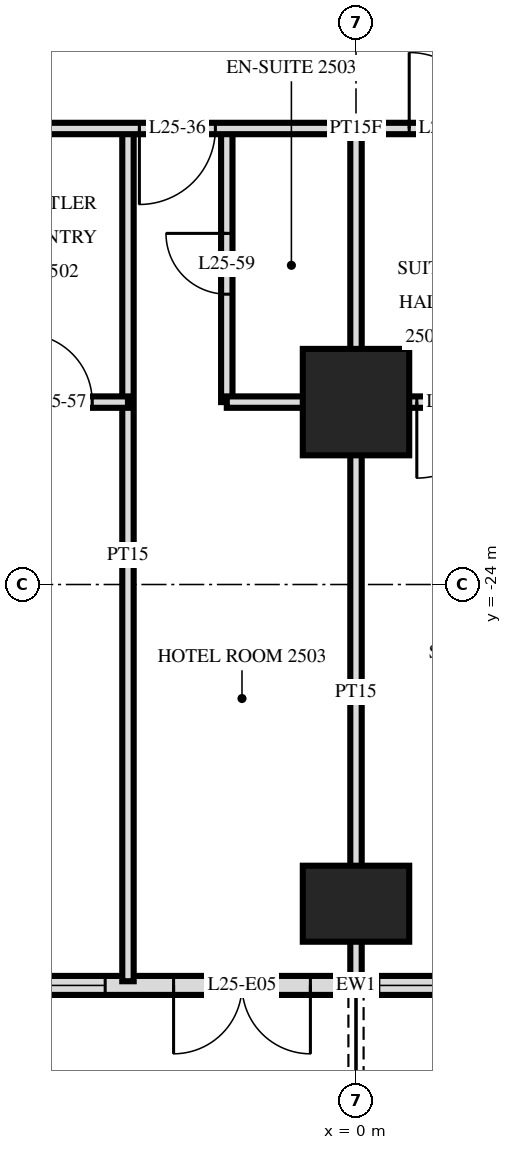
"""IFC4 building model, lengths in metres.
Left out: names, types, materials, properties, quantities, classifications, styles, units other than length and angle.
Written with IfcOpenShell. Run it as: python <this file> out.ifc"""

import sys

from ifc_helpers import new_model, si_unit, direction, frame, frame_2d, origin, origin_2d, place, context, subcontext, project, spatial, rectangle, extrude, element, fill, save


model = new_model("IFC4")
c1 = context("Model", 3, precision=1e-05, world=origin(), true_north=direction((0.0, 1.0)))
c2 = subcontext(c1, "Body", "Model", "MODEL_VIEW")
j1 = project(units=[si_unit("LENGTHUNIT", "METRE"), si_unit("PLANEANGLEUNIT", "RADIAN")], contexts=[c1])
p1 = place(None, origin())
s1 = spatial("IfcSite", under=j1, at=p1, CompositionType="ELEMENT")
p2 = place(p1, origin())
s2 = spatial("IfcBuilding", under=s1, at=p2, CompositionType="ELEMENT")
p3 = place(p2, frame((0.0, 0.0, 99.6)))
s3 = spatial("IfcBuildingStorey", under=s2, at=p3, CompositionType="ELEMENT", Elevation=99.6)
p4 = place(p3, frame((0.0, -28.2, 0.0), z_axis=(0.0, 0.0, 1.0), x_axis=(1.0, 0.0, 0.0)))
e1 = element("IfcColumn", 1, at=p4, inside=s3, PredefinedType="COLUMN", context=c2, shape_type="SweptSolid", body=[
    extrude(rectangle(XDim=1.4, YDim=1.0, at=origin_2d()), origin(), (0.0, 0.0, 1.0), 3.6),
])
p5 = place(p3, frame((0.0, -21.6, 0.0), z_axis=(0.0, 0.0, 1.0), x_axis=(1.0, 0.0, 0.0)))
e2 = element("IfcColumn", 2, at=p5, inside=s3, PredefinedType="COLUMN", context=c2, shape_type="SweptSolid", body=[
    extrude(rectangle(XDim=1.4, YDim=1.4, at=origin_2d()), origin(), (0.0, 0.0, 1.0), 3.6),
])
p6 = place(p3, frame((-28.775, -29.275, 0.0), z_axis=(0.0, 0.0, 1.0), x_axis=(1.0, 0.0, 0.0)))
e3 = element("IfcWall", 3, at=p6, inside=s3, PredefinedType="SOLIDWALL", context=c2, shape_type="SweptSolid", body=[
    extrude(rectangle(XDim=57.551, YDim=0.25, at=frame_2d((28.775, 0.0))), origin(), (0.0, 0.0, 1.0), 3.32),
])
p7 = place(p6, frame((0.575, 0.0, 0.0)))
e4 = element("IfcOpeningElement", 4, at=p7, cuts=e3, PredefinedType="OPENING", context=c2, shape_type="SweptSolid", body=[
    extrude(rectangle(XDim=1.8, YDim=2.4, at=frame_2d((0.9, 1.2))), frame((0.0, 0.135, 0.0), z_axis=(0.0, -1.0, 0.0), x_axis=(1.0, 0.0, 0.0)), (0.0, 0.0, 1.0), 0.27),
])
p8 = place(p6, frame((5.375, 0.0, 0.0)))
e5 = element("IfcOpeningElement", 5, at=p8, cuts=e3, PredefinedType="OPENING", context=c2, shape_type="SweptSolid", body=[
    extrude(rectangle(XDim=1.8, YDim=2.4, at=frame_2d((0.9, 1.2))), frame((0.0, 0.135, 0.0), z_axis=(0.0, -1.0, 0.0), x_axis=(1.0, 0.0, 0.0)), (0.0, 0.0, 1.0), 0.27),
])
p9 = place(p6, frame((8.075, 0.0, 0.3)))
e6 = element("IfcOpeningElement", 6, at=p9, cuts=e3, PredefinedType="OPENING", context=c2, shape_type="SweptSolid", body=[
    extrude(rectangle(XDim=2.4, YDim=2.1, at=frame_2d((1.2, 1.05))), frame((0.0, 0.135, 0.0), z_axis=(0.0, -1.0, 0.0), x_axis=(1.0, 0.0, 0.0)), (0.0, 0.0, 1.0), 0.27),
])
p10 = place(p6, frame((11.375, 0.0, 0.0)))
e7 = element("IfcOpeningElement", 7, at=p10, cuts=e3, PredefinedType="OPENING", context=c2, shape_type="SweptSolid", body=[
    extrude(rectangle(XDim=1.8, YDim=2.4, at=frame_2d((0.9, 1.2))), frame((0.0, 0.135, 0.0), z_axis=(0.0, -1.0, 0.0), x_axis=(1.0, 0.0, 0.0)), (0.0, 0.0, 1.0), 0.27),
])
p11 = place(p6, frame((14.075, 0.0, 0.3)))
e8 = element("IfcOpeningElement", 8, at=p11, cuts=e3, PredefinedType="OPENING", context=c2, shape_type="SweptSolid", body=[
    extrude(rectangle(XDim=2.4, YDim=2.1, at=frame_2d((1.2, 1.05))), frame((0.0, 0.135, 0.0), z_axis=(0.0, -1.0, 0.0), x_axis=(1.0, 0.0, 0.0)), (0.0, 0.0, 1.0), 0.27),
])
p12 = place(p6, frame((17.375, 0.0, 0.0)))
e9 = element("IfcOpeningElement", 9, at=p12, cuts=e3, PredefinedType="OPENING", context=c2, shape_type="SweptSolid", body=[
    extrude(rectangle(XDim=1.8, YDim=2.4, at=frame_2d((0.9, 1.2))), frame((0.0, 0.135, 0.0), z_axis=(0.0, -1.0, 0.0), x_axis=(1.0, 0.0, 0.0)), (0.0, 0.0, 1.0), 0.27),
])
p13 = place(p6, frame((20.075, 0.0, 0.3)))
e10 = element("IfcOpeningElement", 10, at=p13, cuts=e3, PredefinedType="OPENING", context=c2, shape_type="SweptSolid", body=[
    extrude(rectangle(XDim=2.4, YDim=2.1, at=frame_2d((1.2, 1.05))), frame((0.0, 0.135, 0.0), z_axis=(0.0, -1.0, 0.0), x_axis=(1.0, 0.0, 0.0)), (0.0, 0.0, 1.0), 0.27),
])
p14 = place(p6, frame((23.075, 0.0, 0.3)))
e11 = element("IfcOpeningElement", 11, at=p14, cuts=e3, PredefinedType="OPENING", context=c2, shape_type="SweptSolid", body=[
    extrude(rectangle(XDim=2.4, YDim=2.1, at=frame_2d((1.2, 1.05))), frame((0.0, 0.135, 0.0), z_axis=(0.0, -1.0, 0.0), x_axis=(1.0, 0.0, 0.0)), (0.0, 0.0, 1.0), 0.27),
])
p15 = place(p6, frame((26.375, 0.0, 0.0)))
e12 = element("IfcOpeningElement", 12, at=p15, cuts=e3, PredefinedType="OPENING", context=c2, shape_type="SweptSolid", body=[
    extrude(rectangle(XDim=1.8, YDim=2.4, at=frame_2d((0.9, 1.2))), frame((0.0, 0.135, 0.0), z_axis=(0.0, -1.0, 0.0), x_axis=(1.0, 0.0, 0.0)), (0.0, 0.0, 1.0), 0.27),
])
p16 = place(p6, frame((29.075, 0.0, 0.3)))
e13 = element("IfcOpeningElement", 13, at=p16, cuts=e3, PredefinedType="OPENING", context=c2, shape_type="SweptSolid", body=[
    extrude(rectangle(XDim=2.4, YDim=2.1, at=frame_2d((1.2, 1.05))), frame((0.0, 0.135, 0.0), z_axis=(0.0, -1.0, 0.0), x_axis=(1.0, 0.0, 0.0)), (0.0, 0.0, 1.0), 0.27),
])
p17 = place(p6, frame((32.375, 0.0, 0.0)))
e14 = element("IfcOpeningElement", 14, at=p17, cuts=e3, PredefinedType="OPENING", context=c2, shape_type="SweptSolid", body=[
    extrude(rectangle(XDim=1.8, YDim=2.4, at=frame_2d((0.9, 1.2))), frame((0.0, 0.135, 0.0), z_axis=(0.0, -1.0, 0.0), x_axis=(1.0, 0.0, 0.0)), (0.0, 0.0, 1.0), 0.27),
])
p18 = place(p6, frame((35.375, 0.0, 0.0)))
e15 = element("IfcOpeningElement", 15, at=p18, cuts=e3, PredefinedType="OPENING", context=c2, shape_type="SweptSolid", body=[
    extrude(rectangle(XDim=1.8, YDim=2.4, at=frame_2d((0.9, 1.2))), frame((0.0, 0.135, 0.0), z_axis=(0.0, -1.0, 0.0), x_axis=(1.0, 0.0, 0.0)), (0.0, 0.0, 1.0), 0.27),
])
p19 = place(p6, frame((38.075, 0.0, 0.3)))
e16 = element("IfcOpeningElement", 16, at=p19, cuts=e3, PredefinedType="OPENING", context=c2, shape_type="SweptSolid", body=[
    extrude(rectangle(XDim=2.4, YDim=2.1, at=frame_2d((1.2, 1.05))), frame((0.0, 0.135, 0.0), z_axis=(0.0, -1.0, 0.0), x_axis=(1.0, 0.0, 0.0)), (0.0, 0.0, 1.0), 0.27),
])
p20 = place(p6, frame((41.375, 0.0, 0.0)))
e17 = element("IfcOpeningElement", 17, at=p20, cuts=e3, PredefinedType="OPENING", context=c2, shape_type="SweptSolid", body=[
    extrude(rectangle(XDim=1.8, YDim=2.4, at=frame_2d((0.9, 1.2))), frame((0.0, 0.135, 0.0), z_axis=(0.0, -1.0, 0.0), x_axis=(1.0, 0.0, 0.0)), (0.0, 0.0, 1.0), 0.27),
])
p21 = place(p6, frame((44.075, 0.0, 0.3)))
e18 = element("IfcOpeningElement", 18, at=p21, cuts=e3, PredefinedType="OPENING", context=c2, shape_type="SweptSolid", body=[
    extrude(rectangle(XDim=2.4, YDim=2.1, at=frame_2d((1.2, 1.05))), frame((0.0, 0.135, 0.0), z_axis=(0.0, -1.0, 0.0), x_axis=(1.0, 0.0, 0.0)), (0.0, 0.0, 1.0), 0.27),
])
p22 = place(p6, frame((47.075, 0.0, 0.3)))
e19 = element("IfcOpeningElement", 19, at=p22, cuts=e3, PredefinedType="OPENING", context=c2, shape_type="SweptSolid", body=[
    extrude(rectangle(XDim=2.4, YDim=2.1, at=frame_2d((1.2, 1.05))), frame((0.0, 0.135, 0.0), z_axis=(0.0, -1.0, 0.0), x_axis=(1.0, 0.0, 0.0)), (0.0, 0.0, 1.0), 0.27),
])
p23 = place(p6, frame((50.375, 0.0, 0.0)))
e20 = element("IfcOpeningElement", 20, at=p23, cuts=e3, PredefinedType="OPENING", context=c2, shape_type="SweptSolid", body=[
    extrude(rectangle(XDim=1.8, YDim=2.4, at=frame_2d((0.9, 1.2))), frame((0.0, 0.135, 0.0), z_axis=(0.0, -1.0, 0.0), x_axis=(1.0, 0.0, 0.0)), (0.0, 0.0, 1.0), 0.27),
])
p24 = place(p6, frame((53.375, 0.0, 0.0)))
e21 = element("IfcOpeningElement", 21, at=p24, cuts=e3, PredefinedType="OPENING", context=c2, shape_type="SweptSolid", body=[
    extrude(rectangle(XDim=1.8, YDim=2.4, at=frame_2d((0.9, 1.2))), frame((0.0, 0.135, 0.0), z_axis=(0.0, -1.0, 0.0), x_axis=(1.0, 0.0, 0.0)), (0.0, 0.0, 1.0), 0.27),
])
p25 = place(p3, frame((0.0, -21.6, 0.0), z_axis=(0.0, 0.0, 1.0), x_axis=(0.0, 1.0, 0.0)))
e22 = element("IfcWall", 22, at=p25, inside=s3, PredefinedType="PARTITIONING", context=c2, shape_type="SweptSolid", body=[
    extrude(rectangle(XDim=3.6, YDim=0.15, at=frame_2d((1.8, 0.0))), origin(), (0.0, 0.0, 1.0), 3.32),
])
p26 = place(p3, frame((0.0, -29.22, 0.0), z_axis=(0.0, 0.0, 1.0), x_axis=(0.0, 1.0, 0.0)))
e23 = element("IfcWall", 23, at=p26, inside=s3, PredefinedType="PARTITIONING", context=c2, shape_type="SweptSolid", body=[
    extrude(rectangle(XDim=7.62, YDim=0.15, at=frame_2d((3.81, 0.0))), origin(), (0.0, 0.0, 1.0), 3.32),
])
p27 = place(p3, frame((-1.7, -21.6, 0.0), z_axis=(0.0, 0.0, 1.0), x_axis=(0.0, 1.0, 0.0)))
e24 = element("IfcWall", 24, at=p27, inside=s3, PredefinedType="PARTITIONING", context=c2, shape_type="SweptSolid", body=[
    extrude(rectangle(XDim=3.6, YDim=0.15, at=frame_2d((1.8, 0.0))), origin(), (0.0, 0.0, 1.0), 3.32),
])
p28 = place(p27, frame((1.42, 0.0, 0.0)))
e25 = element("IfcOpeningElement", 25, at=p28, cuts=e24, PredefinedType="OPENING", context=c2, shape_type="SweptSolid", body=[
    extrude(rectangle(XDim=0.8, YDim=2.1, at=frame_2d((0.4, 1.05))), frame((0.0, 0.085, 0.0), z_axis=(0.0, -1.0, 0.0), x_axis=(1.0, 0.0, 0.0)), (0.0, 0.0, 1.0), 0.17),
])
p29 = place(p3, frame((-3.0, -29.22, 0.0), z_axis=(0.0, 0.0, 1.0), x_axis=(0.0, 1.0, 0.0)))
e26 = element("IfcWall", 26, at=p29, inside=s3, PredefinedType="PARTITIONING", context=c2, shape_type="SweptSolid", body=[
    extrude(rectangle(XDim=11.22, YDim=0.15, at=frame_2d((5.61, 0.0))), origin(), (0.0, 0.0, 1.0), 3.32),
])
p30 = place(p3, frame((0.0, -21.6, 0.0), z_axis=(0.0, 0.0, 1.0), x_axis=(1.0, 0.0, 0.0)))
e27 = element("IfcWall", 27, at=p30, inside=s3, PredefinedType="PARTITIONING", context=c2, shape_type="SweptSolid", body=[
    extrude(rectangle(XDim=2.4, YDim=0.15, at=frame_2d((1.2, 0.0))), origin(), (0.0, 0.0, 1.0), 3.32),
])
p31 = place(p30, frame((0.8, 0.0, 0.0)))
e28 = element("IfcOpeningElement", 28, at=p31, cuts=e27, PredefinedType="OPENING", context=c2, shape_type="SweptSolid", body=[
    extrude(rectangle(XDim=1.0, YDim=2.1, at=frame_2d((0.5, 1.05))), frame((0.0, 0.085, 0.0), z_axis=(0.0, -1.0, 0.0), x_axis=(1.0, 0.0, 0.0)), (0.0, 0.0, 1.0), 0.17),
])
p32 = place(p3, frame((-10.8, -21.6, 0.0), z_axis=(0.0, 0.0, 1.0), x_axis=(1.0, 0.0, 0.0)))
e29 = element("IfcWall", 29, at=p32, inside=s3, PredefinedType="PARTITIONING", context=c2, shape_type="SweptSolid", body=[
    extrude(rectangle(XDim=7.8, YDim=0.15, at=frame_2d((3.9, 0.0))), origin(), (0.0, 0.0, 1.0), 3.32),
])
p33 = place(p32, frame((1.999, 0.0, 0.0)))
e30 = element("IfcOpeningElement", 30, at=p33, cuts=e29, PredefinedType="OPENING", context=c2, shape_type="SweptSolid", body=[
    extrude(rectangle(XDim=0.8, YDim=2.1, at=frame_2d((0.4, 1.05))), frame((0.0, 0.085, 0.0), z_axis=(0.0, -1.0, 0.0), x_axis=(1.0, 0.0, 0.0)), (0.0, 0.0, 1.0), 0.17),
])
p34 = place(p32, frame((3.1, 0.0, 0.0)))
e31 = element("IfcOpeningElement", 31, at=p34, cuts=e29, PredefinedType="OPENING", context=c2, shape_type="SweptSolid", body=[
    extrude(rectangle(XDim=0.9, YDim=2.1, at=frame_2d((0.45, 1.05))), frame((0.0, 0.085, 0.0), z_axis=(0.0, -1.0, 0.0), x_axis=(1.0, 0.0, 0.0)), (0.0, 0.0, 1.0), 0.17),
])
p35 = place(p32, frame((6.43, 0.0, 0.0)))
e32 = element("IfcOpeningElement", 32, at=p35, cuts=e29, PredefinedType="OPENING", context=c2, shape_type="SweptSolid", body=[
    extrude(rectangle(XDim=0.9, YDim=2.1, at=frame_2d((0.45, 1.05))), frame((0.0, 0.085, 0.0), z_axis=(0.0, -1.0, 0.0), x_axis=(1.0, 0.0, 0.0)), (0.0, 0.0, 1.0), 0.17),
])
p36 = place(p3, frame((-1.7, -21.6, 0.0), z_axis=(0.0, 0.0, 1.0), x_axis=(1.0, 0.0, 0.0)))
e33 = element("IfcWall", 33, at=p36, inside=s3, PredefinedType="PARTITIONING", context=c2, shape_type="SweptSolid", body=[
    extrude(rectangle(XDim=1.7, YDim=0.15, at=frame_2d((0.85, 0.0))), origin(), (0.0, 0.0, 1.0), 3.32),
])
p37 = place(p3, frame((-33.12, -18.0, 0.0), z_axis=(0.0, 0.0, 1.0), x_axis=(1.0, 0.0, 0.0)))
e34 = element("IfcWall", 34, at=p37, inside=s3, PredefinedType="PARTITIONING", context=c2, shape_type="SweptSolid", body=[
    extrude(rectangle(XDim=66.24, YDim=0.15, at=frame_2d((33.12, 0.0))), origin(), (0.0, 0.0, 1.0), 3.32),
])
p38 = place(p37, frame((14.02, 0.0, 0.0)))
e35 = element("IfcOpeningElement", 35, at=p38, cuts=e34, PredefinedType="OPENING", context=c2, shape_type="SweptSolid", body=[
    extrude(rectangle(XDim=1.0, YDim=2.1, at=frame_2d((0.5, 1.05))), frame((0.0, 0.085, 0.0), z_axis=(0.0, -1.0, 0.0), x_axis=(1.0, 0.0, 0.0)), (0.0, 0.0, 1.0), 0.17),
])
p39 = place(p37, frame((18.82, 0.0, 0.0)))
e36 = element("IfcOpeningElement", 36, at=p39, cuts=e34, PredefinedType="OPENING", context=c2, shape_type="SweptSolid", body=[
    extrude(rectangle(XDim=1.0, YDim=2.1, at=frame_2d((0.5, 1.05))), frame((0.0, 0.085, 0.0), z_axis=(0.0, -1.0, 0.0), x_axis=(1.0, 0.0, 0.0)), (0.0, 0.0, 1.0), 0.17),
])
p40 = place(p37, frame((30.27, 0.0, 0.0)))
e37 = element("IfcOpeningElement", 37, at=p40, cuts=e34, PredefinedType="OPENING", context=c2, shape_type="SweptSolid", body=[
    extrude(rectangle(XDim=1.0, YDim=2.1, at=frame_2d((0.5, 1.05))), frame((0.0, 0.085, 0.0), z_axis=(0.0, -1.0, 0.0), x_axis=(1.0, 0.0, 0.0)), (0.0, 0.0, 1.0), 0.17),
])
p41 = place(p37, frame((33.82, 0.0, 0.0)))
e38 = element("IfcOpeningElement", 38, at=p41, cuts=e34, PredefinedType="OPENING", context=c2, shape_type="SweptSolid", body=[
    extrude(rectangle(XDim=1.0, YDim=2.1, at=frame_2d((0.5, 1.05))), frame((0.0, 0.085, 0.0), z_axis=(0.0, -1.0, 0.0), x_axis=(1.0, 0.0, 0.0)), (0.0, 0.0, 1.0), 0.17),
])
p42 = place(p37, frame((46.27, 0.0, 0.0)))
e39 = element("IfcOpeningElement", 39, at=p42, cuts=e34, PredefinedType="OPENING", context=c2, shape_type="SweptSolid", body=[
    extrude(rectangle(XDim=1.0, YDim=2.1, at=frame_2d((0.5, 1.05))), frame((0.0, 0.085, 0.0), z_axis=(0.0, -1.0, 0.0), x_axis=(1.0, 0.0, 0.0)), (0.0, 0.0, 1.0), 0.17),
])
p43 = place(p37, frame((6.07, 0.0, 0.0)))
e40 = element("IfcOpeningElement", 40, at=p43, cuts=e34, PredefinedType="OPENING", context=c2, shape_type="SweptSolid", body=[
    extrude(rectangle(XDim=1.0, YDim=2.1, at=frame_2d((0.5, 1.05))), frame((0.0, 0.085, 0.0), z_axis=(0.0, -1.0, 0.0), x_axis=(1.0, 0.0, 0.0)), (0.0, 0.0, 1.0), 0.17),
])
p44 = place(p37, frame((60.37, 0.0, 0.0)))
e41 = element("IfcOpeningElement", 41, at=p44, cuts=e34, PredefinedType="OPENING", context=c2, shape_type="SweptSolid", body=[
    extrude(rectangle(XDim=1.0, YDim=2.1, at=frame_2d((0.5, 1.05))), frame((0.0, 0.085, 0.0), z_axis=(0.0, -1.0, 0.0), x_axis=(1.0, 0.0, 0.0)), (0.0, 0.0, 1.0), 0.17),
])
p45 = place(p14, origin())
e42 = element("IfcWindow", 42, at=p45, inside=s3, PartitioningType="SINGLE_PANEL", PredefinedType="WINDOW", context=c2, shape_type="SweptSolid", body=[
    extrude(rectangle(XDim=2.4, YDim=2.1, at=frame_2d((1.2, 1.05))), frame((0.0, 0.03, 0.0), z_axis=(0.0, -1.0, 0.0), x_axis=(1.0, 0.0, 0.0)), (0.0, 0.0, 1.0), 0.06),
])
fill(e11, e42)
p46 = place(p15, frame((0.9, 0.0, 0.0), z_axis=(0.0, 0.0, 1.0), x_axis=(-1.0, 0.0, 0.0)))
e43 = element("IfcDoor", 43, at=p46, inside=s3, OperationType="DOUBLE_DOOR_SINGLE_SWING", PredefinedType="DOOR", context=c2, shape_type="SweptSolid", body=[
    extrude(rectangle(XDim=1.8, YDim=2.4, at=frame_2d((0.0, 1.2))), frame((0.0, -0.025, 0.0), z_axis=(0.0, 1.0, 0.0), x_axis=(-1.0, 0.0, 0.0)), (0.0, 0.0, 1.0), 0.05),
])
fill(e12, e43)
p47 = place(p16, origin())
e44 = element("IfcWindow", 44, at=p47, inside=s3, PartitioningType="SINGLE_PANEL", PredefinedType="WINDOW", context=c2, shape_type="SweptSolid", body=[
    extrude(rectangle(XDim=2.4, YDim=2.1, at=frame_2d((1.2, 1.05))), frame((0.0, 0.03, 0.0), z_axis=(0.0, -1.0, 0.0), x_axis=(1.0, 0.0, 0.0)), (0.0, 0.0, 1.0), 0.06),
])
fill(e13, e44)
p48 = place(p40, frame((0.5, 0.0, 0.0), z_axis=(0.0, 0.0, 1.0), x_axis=(-1.0, 0.0, 0.0)))
e45 = element("IfcDoor", 45, at=p48, inside=s3, OperationType="SINGLE_SWING_LEFT", PredefinedType="DOOR", context=c2, shape_type="SweptSolid", body=[
    extrude(rectangle(XDim=1.0, YDim=2.1, at=frame_2d((0.0, 1.05))), frame((0.0, -0.025, 0.0), z_axis=(0.0, 1.0, 0.0), x_axis=(-1.0, 0.0, 0.0)), (0.0, 0.0, 1.0), 0.05),
])
fill(e37, e45)
p49 = place(p41, origin())
e46 = element("IfcDoor", 46, at=p49, inside=s3, OperationType="SINGLE_SWING_RIGHT", PredefinedType="DOOR", context=c2, shape_type="SweptSolid", body=[
    extrude(rectangle(XDim=1.0, YDim=2.1, at=frame_2d((0.5, 1.05))), frame((0.0, 0.025, 0.0), z_axis=(0.0, -1.0, 0.0), x_axis=(1.0, 0.0, 0.0)), (0.0, 0.0, 1.0), 0.05),
])
fill(e38, e46)
p50 = place(p35, origin())
e47 = element("IfcDoor", 47, at=p50, inside=s3, OperationType="SINGLE_SWING_RIGHT", PredefinedType="DOOR", context=c2, shape_type="SweptSolid", body=[
    extrude(rectangle(XDim=0.9, YDim=2.1, at=frame_2d((0.45, 1.05))), frame((0.0, 0.025, 0.0), z_axis=(0.0, -1.0, 0.0), x_axis=(1.0, 0.0, 0.0)), (0.0, 0.0, 1.0), 0.05),
])
fill(e32, e47)
p51 = place(p28, origin())
e48 = element("IfcDoor", 48, at=p51, inside=s3, OperationType="SINGLE_SWING_LEFT", PredefinedType="DOOR", context=c2, shape_type="SweptSolid", body=[
    extrude(rectangle(XDim=0.8, YDim=2.1, at=frame_2d((0.4, 1.05))), frame((0.0, 0.025, 0.0), z_axis=(0.0, -1.0, 0.0), x_axis=(1.0, 0.0, 0.0)), (0.0, 0.0, 1.0), 0.05),
])
fill(e25, e48)
p52 = place(p31, frame((0.5, 0.0, 0.0), z_axis=(0.0, 0.0, 1.0), x_axis=(-1.0, 0.0, 0.0)))
e49 = element("IfcDoor", 49, at=p52, inside=s3, OperationType="SINGLE_SWING_LEFT", PredefinedType="DOOR", context=c2, shape_type="SweptSolid", body=[
    extrude(rectangle(XDim=1.0, YDim=2.1, at=frame_2d((0.0, 1.05))), frame((0.0, -0.025, 0.0), z_axis=(0.0, 1.0, 0.0), x_axis=(-1.0, 0.0, 0.0)), (0.0, 0.0, 1.0), 0.05),
])
fill(e28, e49)
save(model, sys.argv[1])
